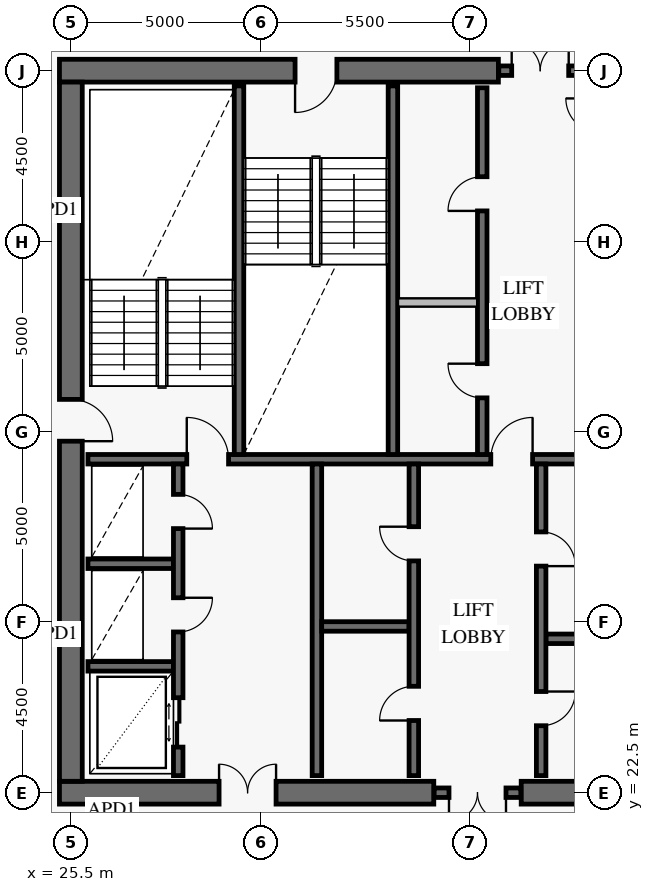
"""IFC4 building model, lengths in metres.
Left out: names, types, materials, properties, quantities, classifications, styles, units other than length and angle.
Written with IfcOpenShell. Run it as: python <this file> out.ifc"""

import sys

from ifc_helpers import new_model, si_unit, direction, frame, frame_2d, origin, place, context, subcontext, project, spatial, rectangle, extrude, element, fill, save


model = new_model("IFC4")
c1 = context("Model", 3, precision=1e-05, world=origin(), true_north=direction((0.0, 1.0)))
c2 = subcontext(c1, "Body", "Model", "MODEL_VIEW")
j1 = project(units=[si_unit("LENGTHUNIT", "METRE"), si_unit("PLANEANGLEUNIT", "RADIAN")], contexts=[c1])
p1 = place(None, origin())
s1 = spatial("IfcSite", under=j1, at=p1, CompositionType="ELEMENT")
p2 = place(p1, origin())
s2 = spatial("IfcBuilding", under=s1, at=p2, CompositionType="ELEMENT")
p3 = place(p2, frame((0.0, 0.0, 242.6)))
s3 = spatial("IfcBuildingStorey", under=s2, at=p3, CompositionType="ELEMENT", Elevation=242.6)
p4 = place(p3, frame((25.2, 22.5, 0.0), z_axis=(0.0, 0.0, 1.0), x_axis=(1.0, 0.0, 0.0)))
e1 = element("IfcWall", 1, at=p4, inside=s3, PredefinedType="SHEAR", context=c2, shape_type="SweptSolid", body=[
    extrude(rectangle(XDim=9.85, YDim=0.6, at=frame_2d((4.925, 0.0))), origin(), (0.0, 0.0, 1.0), 3.8),
])
p5 = place(p4, frame((4.2, 0.0, 0.0)))
e2 = element("IfcOpeningElement", 2, at=p5, cuts=e1, PredefinedType="OPENING", context=c2, shape_type="SweptSolid", body=[
    extrude(rectangle(XDim=1.5, YDim=2.15, at=frame_2d((0.75, 1.075))), frame((0.0, 0.312, 0.0), z_axis=(0.0, -1.0, 0.0), x_axis=(1.0, 0.0, 0.0)), (0.0, 0.0, 1.0), 0.624),
])
p6 = place(p3, frame((37.35, 22.5, 0.0), z_axis=(0.0, 0.0, 1.0), x_axis=(1.0, 0.0, 0.0)))
e3 = element("IfcWall", 3, at=p6, inside=s3, PredefinedType="SHEAR", context=c2, shape_type="SweptSolid", body=[
    extrude(rectangle(XDim=9.45, YDim=0.6, at=frame_2d((4.725, 0.0))), origin(), (0.0, 0.0, 1.0), 3.8),
])
p7 = place(p6, frame((3.95, 0.0, 0.0)))
e4 = element("IfcOpeningElement", 4, at=p7, cuts=e3, PredefinedType="OPENING", context=c2, shape_type="SweptSolid", body=[
    extrude(rectangle(XDim=1.5, YDim=2.15, at=frame_2d((0.75, 1.075))), frame((0.0, 0.312, 0.0), z_axis=(0.0, -1.0, 0.0), x_axis=(1.0, 0.0, 0.0)), (0.0, 0.0, 1.0), 0.624),
])
p8 = place(p3, frame((36.75, 41.5, 0.0), z_axis=(0.0, 0.0, 1.0), x_axis=(-1.0, 0.0, 0.0)))
e5 = element("IfcWall", 5, at=p8, inside=s3, PredefinedType="SHEAR", context=c2, shape_type="SweptSolid", body=[
    extrude(rectangle(XDim=11.55, YDim=0.6, at=frame_2d((5.775, 0.0))), origin(), (0.0, 0.0, 1.0), 3.8),
])
p9 = place(p8, frame((4.25, 0.0, 0.0)))
e6 = element("IfcOpeningElement", 6, at=p9, cuts=e5, PredefinedType="OPENING", context=c2, shape_type="SweptSolid", body=[
    extrude(rectangle(XDim=1.1, YDim=2.15, at=frame_2d((0.55, 1.075))), frame((0.0, 0.312, 0.0), z_axis=(0.0, -1.0, 0.0), x_axis=(1.0, 0.0, 0.0)), (0.0, 0.0, 1.0), 0.624),
])
p10 = place(p3, frame((25.5, 22.8, 0.0), z_axis=(0.0, 0.0, 1.0), x_axis=(0.0, 1.0, 0.0)))
e7 = element("IfcWall", 7, at=p10, inside=s3, PredefinedType="SHEAR", context=c2, shape_type="SweptSolid", body=[
    extrude(rectangle(XDim=18.4, YDim=0.6, at=frame_2d((9.2, 0.0))), origin(), (0.0, 0.0, 1.0), 3.8),
])
p11 = place(p10, frame((8.95, 0.0, 0.0)))
e8 = element("IfcOpeningElement", 8, at=p11, cuts=e7, PredefinedType="OPENING", context=c2, shape_type="SweptSolid", body=[
    extrude(rectangle(XDim=1.1, YDim=2.15, at=frame_2d((0.55, 1.075))), frame((0.0, 0.312, 0.0), z_axis=(0.0, -1.0, 0.0), x_axis=(1.0, 0.0, 0.0)), (0.0, 0.0, 1.0), 0.624),
])
p12 = place(p3, frame((35.06, 22.5, 0.0), z_axis=(0.0, 0.0, 1.0), x_axis=(1.0, 0.0, 0.0)))
e9 = element("IfcWall", 9, at=p12, inside=s3, PredefinedType="SOLIDWALL", context=c2, shape_type="SweptSolid", body=[
    extrude(rectangle(XDim=2.28, YDim=0.25, at=frame_2d((1.14, 0.0))), origin(), (0.0, 0.0, 1.0), 3.8),
])
p13 = place(p12, frame((0.39, 0.0, 0.0)))
e10 = element("IfcOpeningElement", 10, at=p13, cuts=e9, PredefinedType="OPENING", context=c2, shape_type="SweptSolid", body=[
    extrude(rectangle(XDim=1.5, YDim=2.15, at=frame_2d((0.75, 1.075))), frame((0.0, 0.137, 0.0), z_axis=(0.0, -1.0, 0.0), x_axis=(1.0, 0.0, 0.0)), (0.0, 0.0, 1.0), 0.274),
])
p14 = place(p3, frame((36.76, 41.5, 0.0), z_axis=(0.0, 0.0, 1.0), x_axis=(1.0, 0.0, 0.0)))
e11 = element("IfcWall", 11, at=p14, inside=s3, PredefinedType="SOLIDWALL", context=c2, shape_type="SweptSolid", body=[
    extrude(rectangle(XDim=2.18, YDim=0.25, at=frame_2d((1.09, 0.0))), origin(), (0.0, 0.0, 1.0), 3.8),
])
p15 = place(p14, frame((0.34, 0.0, 0.0)))
e12 = element("IfcOpeningElement", 12, at=p15, cuts=e11, PredefinedType="OPENING", context=c2, shape_type="SweptSolid", body=[
    extrude(rectangle(XDim=1.5, YDim=2.15, at=frame_2d((0.75, 1.075))), frame((0.0, 0.137, 0.0), z_axis=(0.0, -1.0, 0.0), x_axis=(1.0, 0.0, 0.0)), (0.0, 0.0, 1.0), 0.274),
])
p16 = place(p3, frame((25.95, 31.275, 0.0), z_axis=(0.0, 0.0, 1.0), x_axis=(1.0, 0.0, 0.0)))
e13 = element("IfcWall", 13, at=p16, inside=s3, PredefinedType="SOLIDWALL", context=c2, shape_type="SweptSolid", body=[
    extrude(rectangle(XDim=20.1, YDim=0.25, at=frame_2d((10.05, 0.0))), origin(), (0.0, 0.0, 1.0), 3.8),
])
p17 = place(p16, frame((2.6, 0.0, 0.0)))
e14 = element("IfcOpeningElement", 14, at=p17, cuts=e13, PredefinedType="OPENING", context=c2, shape_type="SweptSolid", body=[
    extrude(rectangle(XDim=1.1, YDim=2.15, at=frame_2d((0.55, 1.075))), frame((0.0, 0.137, 0.0), z_axis=(0.0, -1.0, 0.0), x_axis=(1.0, 0.0, 0.0)), (0.0, 0.0, 1.0), 0.274),
])
p18 = place(p16, frame((10.6, 0.0, 0.0)))
e15 = element("IfcOpeningElement", 15, at=p18, cuts=e13, PredefinedType="OPENING", context=c2, shape_type="SweptSolid", body=[
    extrude(rectangle(XDim=1.1, YDim=2.15, at=frame_2d((0.55, 1.075))), frame((0.0, 0.137, 0.0), z_axis=(0.0, -1.0, 0.0), x_axis=(1.0, 0.0, 0.0)), (0.0, 0.0, 1.0), 0.274),
])
p19 = place(p16, frame((16.35, 0.0, 0.0)))
e16 = element("IfcOpeningElement", 16, at=p19, cuts=e13, PredefinedType="OPENING", context=c2, shape_type="SweptSolid", body=[
    extrude(rectangle(XDim=1.1, YDim=2.15, at=frame_2d((0.55, 1.075))), frame((0.0, 0.137, 0.0), z_axis=(0.0, -1.0, 0.0), x_axis=(1.0, 0.0, 0.0)), (0.0, 0.0, 1.0), 0.274),
])
for number, where, z_axis, x_axis in (
    (17, (29.925, 31.4, 0.0), (0.0, 0.0, 1.0), (0.0, 1.0, 0.0)),
    (18, (33.975, 31.4, 0.0), (0.0, 0.0, 1.0), (0.0, 1.0, 0.0)),
):
    element("IfcWall", number, at=place(p3, frame(where, z_axis=z_axis, x_axis=x_axis)), inside=s3, PredefinedType="SOLIDWALL", context=c2, shape_type="SweptSolid", body=[
        extrude(rectangle(XDim=9.7, YDim=0.25, at=frame_2d((4.85, 0.0))), origin(), (0.0, 0.0, 1.0), 3.8),
    ])
p20 = place(p3, frame((36.325, 31.4, 0.0), z_axis=(0.0, 0.0, 1.0), x_axis=(0.0, 1.0, 0.0)))
e19 = element("IfcWall", 19, at=p20, inside=s3, PredefinedType="SOLIDWALL", context=c2, shape_type="SweptSolid", body=[
    extrude(rectangle(XDim=9.65, YDim=0.25, at=frame_2d((4.825, 0.0))), origin(), (0.0, 0.0, 1.0), 3.8),
])
p21 = place(p20, frame((1.49, 0.0, 0.0)))
e20 = element("IfcOpeningElement", 20, at=p21, cuts=e19, PredefinedType="OPENING", context=c2, shape_type="SweptSolid", body=[
    extrude(rectangle(XDim=0.9, YDim=2.1, at=frame_2d((0.45, 1.05))), frame((0.0, 0.137, 0.0), z_axis=(0.0, -1.0, 0.0), x_axis=(1.0, 0.0, 0.0)), (0.0, 0.0, 1.0), 0.274),
])
p22 = place(p20, frame((6.41, 0.0, 0.0)))
e21 = element("IfcOpeningElement", 21, at=p22, cuts=e19, PredefinedType="OPENING", context=c2, shape_type="SweptSolid", body=[
    extrude(rectangle(XDim=0.9, YDim=2.1, at=frame_2d((0.45, 1.05))), frame((0.0, 0.137, 0.0), z_axis=(0.0, -1.0, 0.0), x_axis=(1.0, 0.0, 0.0)), (0.0, 0.0, 1.0), 0.274),
])
for number, where, z_axis, x_axis in (
    (22, (25.95, 25.825, 0.0), (0.0, 0.0, 1.0), (1.0, 0.0, 0.0)),
    (23, (25.95, 28.525, 0.0), (0.0, 0.0, 1.0), (1.0, 0.0, 0.0)),
):
    element("IfcWall", number, at=place(p3, frame(where, z_axis=z_axis, x_axis=x_axis)), inside=s3, PredefinedType="SOLIDWALL", context=c2, shape_type="SweptSolid", body=[
        extrude(rectangle(XDim=2.25, YDim=0.25, at=frame_2d((1.125, 0.0))), origin(), (0.0, 0.0, 1.0), 3.8),
    ])
p23 = place(p3, frame((28.325, 22.95, 0.0), z_axis=(0.0, 0.0, 1.0), x_axis=(0.0, 1.0, 0.0)))
e24 = element("IfcWall", 24, at=p23, inside=s3, PredefinedType="SOLIDWALL", context=c2, shape_type="SweptSolid", body=[
    extrude(rectangle(XDim=8.2, YDim=0.25, at=frame_2d((4.1, 0.0))), origin(), (0.0, 0.0, 1.0), 3.8),
])
p24 = place(p23, frame((0.75, 0.0, 0.0)))
e25 = element("IfcOpeningElement", 25, at=p24, cuts=e24, PredefinedType="OPENING", context=c2, shape_type="SweptSolid", body=[
    extrude(rectangle(XDim=1.3, YDim=2.3, at=frame_2d((0.65, 1.15))), frame((0.0, 0.137, 0.0), z_axis=(0.0, -1.0, 0.0), x_axis=(1.0, 0.0, 0.0)), (0.0, 0.0, 1.0), 0.274),
])
p25 = place(p23, frame((3.78, 0.0, 0.0)))
e26 = element("IfcOpeningElement", 26, at=p25, cuts=e24, PredefinedType="OPENING", context=c2, shape_type="SweptSolid", body=[
    extrude(rectangle(XDim=0.9, YDim=2.1, at=frame_2d((0.45, 1.05))), frame((0.0, 0.137, 0.0), z_axis=(0.0, -1.0, 0.0), x_axis=(1.0, 0.0, 0.0)), (0.0, 0.0, 1.0), 0.274),
])
p26 = place(p23, frame((6.5, 0.0, 0.0)))
e27 = element("IfcOpeningElement", 27, at=p26, cuts=e24, PredefinedType="OPENING", context=c2, shape_type="SweptSolid", body=[
    extrude(rectangle(XDim=0.9, YDim=2.1, at=frame_2d((0.45, 1.05))), frame((0.0, 0.137, 0.0), z_axis=(0.0, -1.0, 0.0), x_axis=(1.0, 0.0, 0.0)), (0.0, 0.0, 1.0), 0.274),
])
p27 = place(p3, frame((31.975, 22.95, 0.0), z_axis=(0.0, 0.0, 1.0), x_axis=(0.0, 1.0, 0.0)))
e28 = element("IfcWall", 28, at=p27, inside=s3, PredefinedType="SOLIDWALL", context=c2, shape_type="SweptSolid", body=[
    extrude(rectangle(XDim=8.2, YDim=0.25, at=frame_2d((4.1, 0.0))), origin(), (0.0, 0.0, 1.0), 3.8),
])
p28 = place(p3, frame((32.1, 26.875, 0.0), z_axis=(0.0, 0.0, 1.0), x_axis=(1.0, 0.0, 0.0)))
e29 = element("IfcWall", 29, at=p28, inside=s3, PredefinedType="SOLIDWALL", context=c2, shape_type="SweptSolid", body=[
    extrude(rectangle(XDim=2.3, YDim=0.25, at=frame_2d((1.15, 0.0))), origin(), (0.0, 0.0, 1.0), 3.8),
])
p29 = place(p3, frame((34.525, 22.95, 0.0), z_axis=(0.0, 0.0, 1.0), x_axis=(0.0, 1.0, 0.0)))
e30 = element("IfcWall", 30, at=p29, inside=s3, PredefinedType="SOLIDWALL", context=c2, shape_type="SweptSolid", body=[
    extrude(rectangle(XDim=8.2, YDim=0.25, at=frame_2d((4.1, 0.0))), origin(), (0.0, 0.0, 1.0), 3.8),
])
p30 = place(p29, frame((1.45, 0.0, 0.0)))
e31 = element("IfcOpeningElement", 31, at=p30, cuts=e30, PredefinedType="OPENING", context=c2, shape_type="SweptSolid", body=[
    extrude(rectangle(XDim=0.9, YDim=2.1, at=frame_2d((0.45, 1.05))), frame((0.0, 0.137, 0.0), z_axis=(0.0, -1.0, 0.0), x_axis=(1.0, 0.0, 0.0)), (0.0, 0.0, 1.0), 0.274),
])
p31 = place(p29, frame((5.65, 0.0, 0.0)))
e32 = element("IfcOpeningElement", 32, at=p31, cuts=e30, PredefinedType="OPENING", context=c2, shape_type="SweptSolid", body=[
    extrude(rectangle(XDim=0.9, YDim=2.1, at=frame_2d((0.45, 1.05))), frame((0.0, 0.137, 0.0), z_axis=(0.0, -1.0, 0.0), x_axis=(1.0, 0.0, 0.0)), (0.0, 0.0, 1.0), 0.274),
])
p32 = place(p3, frame((38.0, 26.55, 0.0), z_axis=(0.0, 0.0, 1.0), x_axis=(1.0, 0.0, 0.0)))
e33 = element("IfcWall", 33, at=p32, inside=s3, PredefinedType="SOLIDWALL", context=c2, shape_type="SweptSolid", body=[
    extrude(rectangle(XDim=2.3, YDim=0.25, at=frame_2d((1.15, 0.0))), origin(), (0.0, 0.0, 1.0), 3.8),
])
p33 = place(p3, frame((37.875, 22.95, 0.0), z_axis=(0.0, 0.0, 1.0), x_axis=(0.0, 1.0, 0.0)))
e34 = element("IfcWall", 34, at=p33, inside=s3, PredefinedType="SOLIDWALL", context=c2, shape_type="SweptSolid", body=[
    extrude(rectangle(XDim=8.2, YDim=0.25, at=frame_2d((4.1, 0.0))), origin(), (0.0, 0.0, 1.0), 3.8),
])
p34 = place(p33, frame((1.312, 0.0, 0.0)))
e35 = element("IfcOpeningElement", 35, at=p34, cuts=e34, PredefinedType="OPENING", context=c2, shape_type="SweptSolid", body=[
    extrude(rectangle(XDim=0.9, YDim=2.1, at=frame_2d((0.45, 1.05))), frame((0.0, 0.137, 0.0), z_axis=(0.0, -1.0, 0.0), x_axis=(1.0, 0.0, 0.0)), (0.0, 0.0, 1.0), 0.274),
])
p35 = place(p33, frame((5.512, 0.0, 0.0)))
e36 = element("IfcOpeningElement", 36, at=p35, cuts=e34, PredefinedType="OPENING", context=c2, shape_type="SweptSolid", body=[
    extrude(rectangle(XDim=0.9, YDim=2.1, at=frame_2d((0.45, 1.05))), frame((0.0, 0.137, 0.0), z_axis=(0.0, -1.0, 0.0), x_axis=(1.0, 0.0, 0.0)), (0.0, 0.0, 1.0), 0.274),
])
p36 = place(p3, frame((34.108, 35.4, 0.0), z_axis=(0.0, 0.0, 1.0), x_axis=(1.0, 0.0, 0.0)))
e37 = element("IfcWall", 37, at=p36, inside=s3, PredefinedType="PARTITIONING", context=c2, shape_type="SweptSolid", body=[
    extrude(rectangle(XDim=2.084, YDim=0.22, at=frame_2d((1.042, 0.0))), origin(), (0.0, 0.0, 1.0), 3.55),
])
p37 = place(p11, frame((1.1, 0.0, 0.0), z_axis=(0.0, 0.0, 1.0), x_axis=(-1.0, 0.0, 0.0)))
e38 = element("IfcDoor", 38, at=p37, inside=s3, OperationType="SINGLE_SWING_RIGHT", PredefinedType="USERDEFINED", context=c2, shape_type="SweptSolid", body=[
    extrude(rectangle(XDim=1.1, YDim=2.15, at=frame_2d((0.55, 1.075))), frame((0.0, 0.025, 0.0), z_axis=(0.0, -1.0, 0.0), x_axis=(1.0, 0.0, 0.0)), (0.0, 0.0, 1.0), 0.05),
])
fill(e8, e38)
p38 = place(p9, origin())
e39 = element("IfcDoor", 39, at=p38, inside=s3, OperationType="SINGLE_SWING_RIGHT", PredefinedType="USERDEFINED", context=c2, shape_type="SweptSolid", body=[
    extrude(rectangle(XDim=1.1, YDim=2.15, at=frame_2d((0.55, 1.075))), frame((0.0, 0.025, 0.0), z_axis=(0.0, -1.0, 0.0), x_axis=(1.0, 0.0, 0.0)), (0.0, 0.0, 1.0), 0.05),
])
fill(e6, e39)
p39 = place(p5, origin())
e40 = element("IfcDoor", 40, at=p39, inside=s3, OperationType="DOUBLE_DOOR_SINGLE_SWING", PredefinedType="DOOR", context=c2, shape_type="SweptSolid", body=[
    extrude(rectangle(XDim=1.5, YDim=2.15, at=frame_2d((0.75, 1.075))), frame((0.0, 0.025, 0.0), z_axis=(0.0, -1.0, 0.0), x_axis=(1.0, 0.0, 0.0)), (0.0, 0.0, 1.0), 0.05),
])
fill(e2, e40)
p40 = place(p13, frame((1.5, 0.0, 0.0), z_axis=(0.0, 0.0, 1.0), x_axis=(-1.0, 0.0, 0.0)))
e41 = element("IfcDoor", 41, at=p40, inside=s3, OperationType="DOUBLE_DOOR_SINGLE_SWING", PredefinedType="DOOR", context=c2, shape_type="SweptSolid", body=[
    extrude(rectangle(XDim=1.5, YDim=2.15, at=frame_2d((0.75, 1.075))), frame((0.0, 0.025, 0.0), z_axis=(0.0, -1.0, 0.0), x_axis=(1.0, 0.0, 0.0)), (0.0, 0.0, 1.0), 0.05),
])
fill(e10, e41)
p41 = place(p15, origin())
e42 = element("IfcDoor", 42, at=p41, inside=s3, OperationType="DOUBLE_DOOR_SINGLE_SWING", PredefinedType="DOOR", context=c2, shape_type="SweptSolid", body=[
    extrude(rectangle(XDim=1.5, YDim=2.15, at=frame_2d((0.75, 1.075))), frame((0.0, 0.025, 0.0), z_axis=(0.0, -1.0, 0.0), x_axis=(1.0, 0.0, 0.0)), (0.0, 0.0, 1.0), 0.05),
])
fill(e12, e42)
p42 = place(p17, origin())
e43 = element("IfcDoor", 43, at=p42, inside=s3, OperationType="SINGLE_SWING_LEFT", PredefinedType="USERDEFINED", context=c2, shape_type="SweptSolid", body=[
    extrude(rectangle(XDim=1.1, YDim=2.15, at=frame_2d((0.55, 1.075))), frame((0.0, 0.025, 0.0), z_axis=(0.0, -1.0, 0.0), x_axis=(1.0, 0.0, 0.0)), (0.0, 0.0, 1.0), 0.05),
])
fill(e14, e43)
p43 = place(p18, origin())
e44 = element("IfcDoor", 44, at=p43, inside=s3, OperationType="SINGLE_SWING_RIGHT", PredefinedType="USERDEFINED", context=c2, shape_type="SweptSolid", body=[
    extrude(rectangle(XDim=1.1, YDim=2.15, at=frame_2d((0.55, 1.075))), frame((0.0, 0.025, 0.0), z_axis=(0.0, -1.0, 0.0), x_axis=(1.0, 0.0, 0.0)), (0.0, 0.0, 1.0), 0.05),
])
fill(e15, e44)
p44 = place(p21, origin())
e45 = element("IfcDoor", 45, at=p44, inside=s3, OperationType="SINGLE_SWING_RIGHT", PredefinedType="DOOR", context=c2, shape_type="SweptSolid", body=[
    extrude(rectangle(XDim=0.9, YDim=2.1, at=frame_2d((0.45, 1.05))), frame((0.0, 0.025, 0.0), z_axis=(0.0, -1.0, 0.0), x_axis=(1.0, 0.0, 0.0)), (0.0, 0.0, 1.0), 0.05),
])
fill(e20, e45)
p45 = place(p22, origin())
e46 = element("IfcDoor", 46, at=p45, inside=s3, OperationType="SINGLE_SWING_LEFT", PredefinedType="DOOR", context=c2, shape_type="SweptSolid", body=[
    extrude(rectangle(XDim=0.9, YDim=2.1, at=frame_2d((0.45, 1.05))), frame((0.0, 0.025, 0.0), z_axis=(0.0, -1.0, 0.0), x_axis=(1.0, 0.0, 0.0)), (0.0, 0.0, 1.0), 0.05),
])
fill(e21, e46)
p46 = place(p24, frame((1.3, 0.0, 0.0), z_axis=(0.0, 0.0, 1.0), x_axis=(-1.0, 0.0, 0.0)))
e47 = element("IfcDoor", 47, at=p46, inside=s3, OperationType="DOUBLE_DOOR_SLIDING", PredefinedType="DOOR", context=c2, shape_type="SweptSolid", body=[
    extrude(rectangle(XDim=1.3, YDim=2.3, at=frame_2d((0.65, 1.15))), frame((0.0, 0.025, 0.0), z_axis=(0.0, -1.0, 0.0), x_axis=(1.0, 0.0, 0.0)), (0.0, 0.0, 1.0), 0.05),
])
fill(e25, e47)
p47 = place(p25, frame((0.9, 0.0, 0.0), z_axis=(0.0, 0.0, 1.0), x_axis=(-1.0, 0.0, 0.0)))
e48 = element("IfcDoor", 48, at=p47, inside=s3, OperationType="SINGLE_SWING_LEFT", PredefinedType="DOOR", context=c2, shape_type="SweptSolid", body=[
    extrude(rectangle(XDim=0.9, YDim=2.1, at=frame_2d((0.45, 1.05))), frame((0.0, 0.025, 0.0), z_axis=(0.0, -1.0, 0.0), x_axis=(1.0, 0.0, 0.0)), (0.0, 0.0, 1.0), 0.05),
])
fill(e26, e48)
p48 = place(p26, frame((0.9, 0.0, 0.0), z_axis=(0.0, 0.0, 1.0), x_axis=(-1.0, 0.0, 0.0)))
e49 = element("IfcDoor", 49, at=p48, inside=s3, OperationType="SINGLE_SWING_RIGHT", PredefinedType="DOOR", context=c2, shape_type="SweptSolid", body=[
    extrude(rectangle(XDim=0.9, YDim=2.1, at=frame_2d((0.45, 1.05))), frame((0.0, 0.025, 0.0), z_axis=(0.0, -1.0, 0.0), x_axis=(1.0, 0.0, 0.0)), (0.0, 0.0, 1.0), 0.05),
])
fill(e27, e49)
p49 = place(p30, origin())
e50 = element("IfcDoor", 50, at=p49, inside=s3, OperationType="SINGLE_SWING_LEFT", PredefinedType="DOOR", context=c2, shape_type="SweptSolid", body=[
    extrude(rectangle(XDim=0.9, YDim=2.1, at=frame_2d((0.45, 1.05))), frame((0.0, 0.025, 0.0), z_axis=(0.0, -1.0, 0.0), x_axis=(1.0, 0.0, 0.0)), (0.0, 0.0, 1.0), 0.05),
])
fill(e31, e50)
p50 = place(p31, origin())
e51 = element("IfcDoor", 51, at=p50, inside=s3, OperationType="SINGLE_SWING_RIGHT", PredefinedType="DOOR", context=c2, shape_type="SweptSolid", body=[
    extrude(rectangle(XDim=0.9, YDim=2.1, at=frame_2d((0.45, 1.05))), frame((0.0, 0.025, 0.0), z_axis=(0.0, -1.0, 0.0), x_axis=(1.0, 0.0, 0.0)), (0.0, 0.0, 1.0), 0.05),
])
fill(e32, e51)
p51 = place(p34, frame((0.9, 0.0, 0.0), z_axis=(0.0, 0.0, 1.0), x_axis=(-1.0, 0.0, 0.0)))
e52 = element("IfcDoor", 52, at=p51, inside=s3, OperationType="SINGLE_SWING_LEFT", PredefinedType="DOOR", context=c2, shape_type="SweptSolid", body=[
    extrude(rectangle(XDim=0.9, YDim=2.1, at=frame_2d((0.45, 1.05))), frame((0.0, 0.025, 0.0), z_axis=(0.0, -1.0, 0.0), x_axis=(1.0, 0.0, 0.0)), (0.0, 0.0, 1.0), 0.05),
])
fill(e35, e52)
p52 = place(p35, frame((0.9, 0.0, 0.0), z_axis=(0.0, 0.0, 1.0), x_axis=(-1.0, 0.0, 0.0)))
e53 = element("IfcDoor", 53, at=p52, inside=s3, OperationType="SINGLE_SWING_RIGHT", PredefinedType="DOOR", context=c2, shape_type="SweptSolid", body=[
    extrude(rectangle(XDim=0.9, YDim=2.1, at=frame_2d((0.45, 1.05))), frame((0.0, 0.025, 0.0), z_axis=(0.0, -1.0, 0.0), x_axis=(1.0, 0.0, 0.0)), (0.0, 0.0, 1.0), 0.05),
])
fill(e36, e53)
save(model, sys.argv[1])
